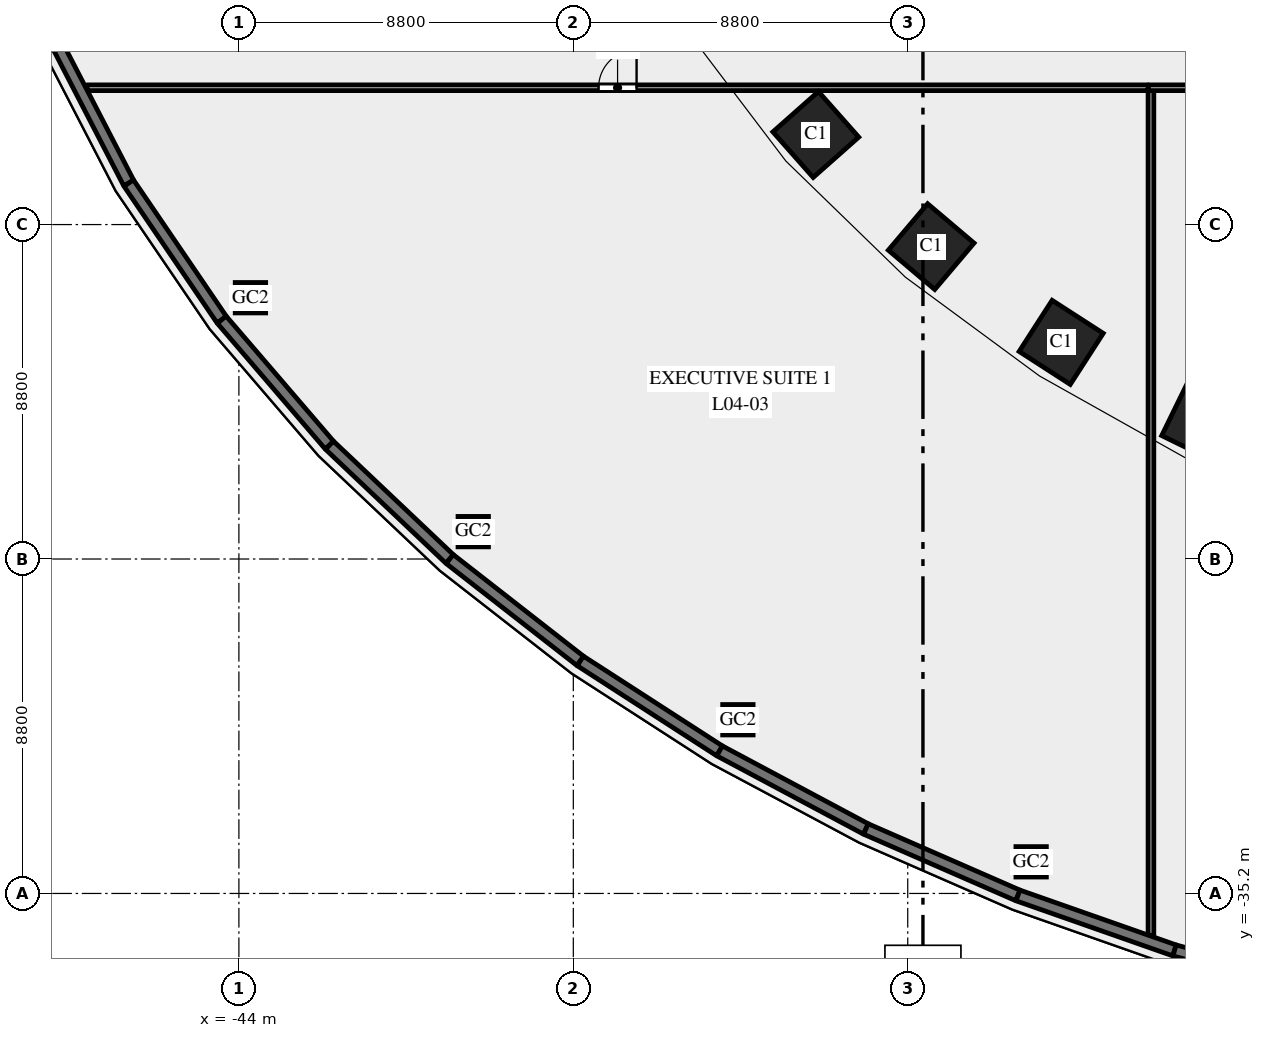
"""IFC4 building model, lengths in metres.
Left out: names, types, materials, properties, quantities, classifications, styles, units other than length and angle.
Written with IfcOpenShell. Run it as: python <this file> out.ifc"""

import sys

from ifc_helpers import new_model, si_unit, direction, frame, frame_2d, origin, origin_2d, place, context, subcontext, project, spatial, rectangle, hollow_rectangle, extrude, element, fill, save


model = new_model("IFC4")
c1 = context("Model", 3, precision=1e-05, world=origin(), true_north=direction((0.0, 1.0)))
c2 = subcontext(c1, "Body", "Model", "MODEL_VIEW")
j1 = project(units=[si_unit("LENGTHUNIT", "METRE"), si_unit("PLANEANGLEUNIT", "RADIAN")], contexts=[c1])
p1 = place(None, origin())
s1 = spatial("IfcSite", under=j1, at=p1, CompositionType="ELEMENT")
p2 = place(p1, origin())
s2 = spatial("IfcBuilding", under=s1, at=p2, CompositionType="ELEMENT")
p3 = place(p2, frame((0.0, 0.0, 25.0)))
s3 = spatial("IfcBuildingStorey", under=s2, at=p3, CompositionType="ELEMENT", Elevation=25.0)
for number, where, z_axis, x_axis in (
    (1, (-28.819, -15.23, 0.0), (0.0, 0.0, 1.0), (0.663, -0.749, 0.0)),
    (2, (-25.783, -18.18, 0.0), (0.0, 0.0, 1.0), (0.763, -0.646, 0.0)),
    (3, (-22.362, -20.7, 0.0), (0.0, 0.0, 1.0), (0.84, -0.542, 0.0)),
    (4, (-18.646, -22.785, 0.0), (0.0, 0.0, 1.0), (0.898, -0.439, 0.0)),
):
    element("IfcColumn", number, at=place(p3, frame(where, z_axis=z_axis, x_axis=x_axis)), inside=s3, PredefinedType="COLUMN", context=c2, shape_type="SweptSolid", body=[
        extrude(rectangle(XDim=1.6, YDim=1.6, at=origin_2d()), origin(), (0.0, 0.0, 1.0), 5.5),
    ])
for number, where, z_axis, x_axis in (
    (5, (-43.696, -19.525, 0.0), (0.0, 0.0, 1.0), (1.0, 0.0, 0.0)),
    (6, (-37.833, -25.68, 0.0), (0.0, 0.0, 1.0), (1.0, 0.0, 0.0)),
    (7, (-30.869, -30.629, 0.0), (0.0, 0.0, 1.0), (1.0, 0.0, 0.0)),
    (8, (-23.153, -34.368, 0.0), (0.0, 0.0, 1.0), (1.0, 0.0, 0.0)),
):
    element("IfcColumn", number, at=place(p3, frame(where, z_axis=z_axis, x_axis=x_axis)), inside=s3, PredefinedType="COLUMN", context=c2, shape_type="SweptSolid", body=[
        extrude(hollow_rectangle(XDim=0.8, YDim=0.8, WallThickness=0.04, at=origin_2d()), origin(), (0.0, 0.0, 1.0), 5.488),
    ])
p4 = place(p3, frame((-20.0, -36.302, 0.0), z_axis=(0.0, 0.0, 1.0), x_axis=(0.0, 1.0, 0.0)))
e9 = element("IfcWall", 9, at=p4, inside=s3, PredefinedType="PARTITIONING", context=c2, shape_type="SweptSolid", body=[
    extrude(rectangle(XDim=22.228, YDim=0.15, at=frame_2d((11.114, 0.0))), origin(), (0.0, 0.0, 1.0), 4.15),
])
p5 = place(p3, frame((-20.075, -14.0, 0.0), z_axis=(0.0, 0.0, 1.0), x_axis=(1.0, 0.0, 0.0)))
e10 = element("IfcWall", 10, at=p5, inside=s3, PredefinedType="PARTITIONING", context=c2, shape_type="SweptSolid", body=[
    extrude(rectangle(XDim=40.15, YDim=0.15, at=frame_2d((20.075, 0.0))), origin(), (0.0, 0.0, 1.0), 4.15),
])
p6 = place(p5, frame((19.375, 0.0, 0.0)))
e11 = element("IfcOpeningElement", 11, at=p6, cuts=e10, PredefinedType="OPENING", context=c2, shape_type="SweptSolid", body=[
    extrude(rectangle(XDim=1.4, YDim=2.1, at=frame_2d((0.7, 1.05))), frame((0.0, 0.085, 0.0), z_axis=(0.0, -1.0, 0.0), x_axis=(1.0, 0.0, 0.0)), (0.0, 0.0, 1.0), 0.17),
])
p7 = place(p3, frame((-47.997, -14.0, 0.0), z_axis=(0.0, 0.0, 1.0), x_axis=(1.0, 0.0, 0.0)))
e12 = element("IfcWall", 12, at=p7, inside=s3, PredefinedType="PARTITIONING", context=c2, shape_type="SweptSolid", body=[
    extrude(rectangle(XDim=27.923, YDim=0.15, at=frame_2d((13.961, 0.0))), origin(), (0.0, 0.0, 1.0), 4.2),
])
p8 = place(p7, frame((13.462, 0.0, 0.0)))
e13 = element("IfcOpeningElement", 13, at=p8, cuts=e12, PredefinedType="OPENING", context=c2, shape_type="SweptSolid", body=[
    extrude(rectangle(XDim=1.0, YDim=2.1, at=frame_2d((0.5, 1.05))), frame((0.0, 0.085, 0.0), z_axis=(0.0, -1.0, 0.0), x_axis=(1.0, 0.0, 0.0)), (0.0, 0.0, 1.0), 0.17),
])
p9 = place(p3, frame((-48.894, -12.649, 0.0), z_axis=(0.0, 0.0, 1.0), x_axis=(0.459242531468, -0.888310923771, 0.0)))
e14 = element("IfcWall", 14, at=p9, inside=s3, PredefinedType="SOLIDWALL", context=c2, shape_type="SweptSolid", body=[
    extrude(rectangle(XDim=4.345, YDim=0.3, at=frame_2d((2.172, 0.0))), origin(), (0.0, 0.0, 1.0), 5.2),
])
p10 = place(p9, frame((0.972, 0.0, 1.0)))
e15 = element("IfcOpeningElement", 15, at=p10, cuts=e14, PredefinedType="OPENING", context=c2, shape_type="SweptSolid", body=[
    extrude(rectangle(XDim=2.4, YDim=3.0, at=frame_2d((1.2, 1.5))), frame((0.0, 0.16, 0.0), z_axis=(0.0, -1.0, 0.0), x_axis=(1.0, 0.0, 0.0)), (0.0, 0.0, 1.0), 0.32),
])
p11 = place(p3, frame((-46.899, -16.508, 0.0), z_axis=(0.0, 0.0, 1.0), x_axis=(0.562667738859, -0.82668314102, 0.0)))
e16 = element("IfcWall", 16, at=p11, inside=s3, PredefinedType="SOLIDWALL", context=c2, shape_type="SweptSolid", body=[
    extrude(rectangle(XDim=4.349, YDim=0.3, at=frame_2d((2.174, 0.0))), origin(), (0.0, 0.0, 1.0), 5.2),
])
p12 = place(p11, frame((0.974, 0.0, 1.0)))
e17 = element("IfcOpeningElement", 17, at=p12, cuts=e16, PredefinedType="OPENING", context=c2, shape_type="SweptSolid", body=[
    extrude(rectangle(XDim=2.4, YDim=3.0, at=frame_2d((1.2, 1.5))), frame((0.0, 0.16, 0.0), z_axis=(0.0, -1.0, 0.0), x_axis=(1.0, 0.0, 0.0)), (0.0, 0.0, 1.0), 0.32),
])
p13 = place(p3, frame((-44.452, -20.104, 0.0), z_axis=(0.0, 0.0, 1.0), x_axis=(0.651387059497, -0.758745608699, 0.0)))
e18 = element("IfcWall", 18, at=p13, inside=s3, PredefinedType="SOLIDWALL", context=c2, shape_type="SweptSolid", body=[
    extrude(rectangle(XDim=4.353, YDim=0.3, at=frame_2d((2.176, 0.0))), origin(), (0.0, 0.0, 1.0), 5.2),
])
p14 = place(p13, frame((0.976, 0.0, 1.0)))
e19 = element("IfcOpeningElement", 19, at=p14, cuts=e18, PredefinedType="OPENING", context=c2, shape_type="SweptSolid", body=[
    extrude(rectangle(XDim=2.4, YDim=3.0, at=frame_2d((1.2, 1.5))), frame((0.0, 0.16, 0.0), z_axis=(0.0, -1.0, 0.0), x_axis=(1.0, 0.0, 0.0)), (0.0, 0.0, 1.0), 0.32),
])
p15 = place(p3, frame((-41.617, -23.406, 0.0), z_axis=(0.0, 0.0, 1.0), x_axis=(0.72620446032, -0.687478786444, 0.0)))
e20 = element("IfcWall", 20, at=p15, inside=s3, PredefinedType="SOLIDWALL", context=c2, shape_type="SweptSolid", body=[
    extrude(rectangle(XDim=4.356, YDim=0.3, at=frame_2d((2.178, 0.0))), origin(), (0.0, 0.0, 1.0), 5.2),
])
p16 = place(p15, frame((0.978, 0.0, 1.0)))
e21 = element("IfcOpeningElement", 21, at=p16, cuts=e20, PredefinedType="OPENING", context=c2, shape_type="SweptSolid", body=[
    extrude(rectangle(XDim=2.4, YDim=3.0, at=frame_2d((1.2, 1.5))), frame((0.0, 0.16, 0.0), z_axis=(0.0, -1.0, 0.0), x_axis=(1.0, 0.0, 0.0)), (0.0, 0.0, 1.0), 0.32),
])
p17 = place(p3, frame((-38.453, -26.401, 0.0), z_axis=(0.0, 0.0, 1.0), x_axis=(0.788491985196, -0.615045030288, 0.0)))
e22 = element("IfcWall", 22, at=p17, inside=s3, PredefinedType="SOLIDWALL", context=c2, shape_type="SweptSolid", body=[
    extrude(rectangle(XDim=4.359, YDim=0.3, at=frame_2d((2.18, 0.0))), origin(), (0.0, 0.0, 1.0), 5.2),
])
p18 = place(p17, frame((0.98, 0.0, 1.0)))
e23 = element("IfcOpeningElement", 23, at=p18, cuts=e22, PredefinedType="OPENING", context=c2, shape_type="SweptSolid", body=[
    extrude(rectangle(XDim=2.4, YDim=3.0, at=frame_2d((1.2, 1.5))), frame((0.0, 0.16, 0.0), z_axis=(0.0, -1.0, 0.0), x_axis=(1.0, 0.0, 0.0)), (0.0, 0.0, 1.0), 0.32),
])
p19 = place(p3, frame((-35.016, -29.082, 0.0), z_axis=(0.0, 0.0, 1.0), x_axis=(0.840047348843, -0.542513088969, 0.0)))
e24 = element("IfcWall", 24, at=p19, inside=s3, PredefinedType="SOLIDWALL", context=c2, shape_type="SweptSolid", body=[
    extrude(rectangle(XDim=4.362, YDim=0.3, at=frame_2d((2.181, 0.0))), origin(), (0.0, 0.0, 1.0), 5.2),
])
p20 = place(p19, frame((0.981, 0.0, 1.0)))
e25 = element("IfcOpeningElement", 25, at=p20, cuts=e24, PredefinedType="OPENING", context=c2, shape_type="SweptSolid", body=[
    extrude(rectangle(XDim=2.4, YDim=3.0, at=frame_2d((1.2, 1.5))), frame((0.0, 0.16, 0.0), z_axis=(0.0, -1.0, 0.0), x_axis=(1.0, 0.0, 0.0)), (0.0, 0.0, 1.0), 0.32),
])
p21 = place(p3, frame((-31.352, -31.448, 0.0), z_axis=(0.0, 0.0, 1.0), x_axis=(0.882159305704, -0.47095112205, 0.0)))
e26 = element("IfcWall", 26, at=p21, inside=s3, PredefinedType="SOLIDWALL", context=c2, shape_type="SweptSolid", body=[
    extrude(rectangle(XDim=4.365, YDim=0.3, at=frame_2d((2.182, 0.0))), origin(), (0.0, 0.0, 1.0), 5.2),
])
p22 = place(p21, frame((0.982, 0.0, 1.0)))
e27 = element("IfcOpeningElement", 27, at=p22, cuts=e26, PredefinedType="OPENING", context=c2, shape_type="SweptSolid", body=[
    extrude(rectangle(XDim=2.4, YDim=3.0, at=frame_2d((1.2, 1.5))), frame((0.0, 0.16, 0.0), z_axis=(0.0, -1.0, 0.0), x_axis=(1.0, 0.0, 0.0)), (0.0, 0.0, 1.0), 0.32),
])
p23 = place(p3, frame((-27.501, -33.504, 0.0), z_axis=(0.0, 0.0, 1.0), x_axis=(0.916336904548, -0.400408138483, 0.0)))
e28 = element("IfcWall", 28, at=p23, inside=s3, PredefinedType="SOLIDWALL", context=c2, shape_type="SweptSolid", body=[
    extrude(rectangle(XDim=4.366, YDim=0.3, at=frame_2d((2.183, 0.0))), origin(), (0.0, 0.0, 1.0), 5.2),
])
p24 = place(p23, frame((0.983, 0.0, 1.0)))
e29 = element("IfcOpeningElement", 29, at=p24, cuts=e28, PredefinedType="OPENING", context=c2, shape_type="SweptSolid", body=[
    extrude(rectangle(XDim=2.4, YDim=3.0, at=frame_2d((1.2, 1.5))), frame((0.0, 0.16, 0.0), z_axis=(0.0, -1.0, 0.0), x_axis=(1.0, 0.0, 0.0)), (0.0, 0.0, 1.0), 0.32),
])
p25 = place(p3, frame((-23.5, -35.252, 0.0), z_axis=(0.0, 0.0, 1.0), x_axis=(0.943526738033, -0.331296384853, 0.0)))
e30 = element("IfcWall", 30, at=p25, inside=s3, PredefinedType="SOLIDWALL", context=c2, shape_type="SweptSolid", body=[
    extrude(rectangle(XDim=4.368, YDim=0.3, at=frame_2d((2.184, 0.0))), origin(), (0.0, 0.0, 1.0), 5.2),
])
p26 = place(p25, frame((0.984, 0.0, 1.0)))
e31 = element("IfcOpeningElement", 31, at=p26, cuts=e30, PredefinedType="OPENING", context=c2, shape_type="SweptSolid", body=[
    extrude(rectangle(XDim=2.4, YDim=3.0, at=frame_2d((1.2, 1.5))), frame((0.0, 0.16, 0.0), z_axis=(0.0, -1.0, 0.0), x_axis=(1.0, 0.0, 0.0)), (0.0, 0.0, 1.0), 0.32),
])
p27 = place(p3, frame((-19.379, -36.699, 0.0), z_axis=(0.0, 0.0, 1.0), x_axis=(0.964679950239, -0.263424739931, 0.0)))
e32 = element("IfcWall", 32, at=p27, inside=s3, PredefinedType="SOLIDWALL", context=c2, shape_type="SweptSolid", body=[
    extrude(rectangle(XDim=4.369, YDim=0.3, at=frame_2d((2.185, 0.0))), origin(), (0.0, 0.0, 1.0), 5.2),
])
p28 = place(p27, frame((0.985, 0.0, 1.0)))
e33 = element("IfcOpeningElement", 33, at=p28, cuts=e32, PredefinedType="OPENING", context=c2, shape_type="SweptSolid", body=[
    extrude(rectangle(XDim=2.4, YDim=3.0, at=frame_2d((1.2, 1.5))), frame((0.0, 0.16, 0.0), z_axis=(0.0, -1.0, 0.0), x_axis=(1.0, 0.0, 0.0)), (0.0, 0.0, 1.0), 0.32),
])
p29 = place(p8, origin())
e34 = element("IfcDoor", 34, at=p29, inside=s3, OperationType="SINGLE_SWING_RIGHT", PredefinedType="DOOR", context=c2, shape_type="SweptSolid", body=[
    extrude(rectangle(XDim=1.0, YDim=2.1, at=frame_2d((0.5, 1.05))), frame((0.0, 0.025, 0.0), z_axis=(0.0, -1.0, 0.0), x_axis=(1.0, 0.0, 0.0)), (0.0, 0.0, 1.0), 0.05),
])
fill(e13, e34)
p30 = place(p10, origin())
e35 = element("IfcWindow", 35, at=p30, inside=s3, PartitioningType="SINGLE_PANEL", PredefinedType="WINDOW", context=c2, shape_type="SweptSolid", body=[
    extrude(rectangle(XDim=2.4, YDim=3.0, at=frame_2d((1.2, 1.5))), frame((0.0, 0.03, 0.0), z_axis=(0.0, -1.0, 0.0), x_axis=(1.0, 0.0, 0.0)), (0.0, 0.0, 1.0), 0.06),
])
fill(e15, e35)
p31 = place(p12, origin())
e36 = element("IfcWindow", 36, at=p31, inside=s3, PartitioningType="SINGLE_PANEL", PredefinedType="WINDOW", context=c2, shape_type="SweptSolid", body=[
    extrude(rectangle(XDim=2.4, YDim=3.0, at=frame_2d((1.2, 1.5))), frame((0.0, 0.03, 0.0), z_axis=(0.0, -1.0, 0.0), x_axis=(1.0, 0.0, 0.0)), (0.0, 0.0, 1.0), 0.06),
])
fill(e17, e36)
p32 = place(p14, origin())
e37 = element("IfcWindow", 37, at=p32, inside=s3, PartitioningType="SINGLE_PANEL", PredefinedType="WINDOW", context=c2, shape_type="SweptSolid", body=[
    extrude(rectangle(XDim=2.4, YDim=3.0, at=frame_2d((1.2, 1.5))), frame((0.0, 0.03, 0.0), z_axis=(0.0, -1.0, 0.0), x_axis=(1.0, 0.0, 0.0)), (0.0, 0.0, 1.0), 0.06),
])
fill(e19, e37)
p33 = place(p16, origin())
e38 = element("IfcWindow", 38, at=p33, inside=s3, PartitioningType="SINGLE_PANEL", PredefinedType="WINDOW", context=c2, shape_type="SweptSolid", body=[
    extrude(rectangle(XDim=2.4, YDim=3.0, at=frame_2d((1.2, 1.5))), frame((0.0, 0.03, 0.0), z_axis=(0.0, -1.0, 0.0), x_axis=(1.0, 0.0, 0.0)), (0.0, 0.0, 1.0), 0.06),
])
fill(e21, e38)
p34 = place(p18, origin())
e39 = element("IfcWindow", 39, at=p34, inside=s3, PartitioningType="SINGLE_PANEL", PredefinedType="WINDOW", context=c2, shape_type="SweptSolid", body=[
    extrude(rectangle(XDim=2.4, YDim=3.0, at=frame_2d((1.2, 1.5))), frame((0.0, 0.03, 0.0), z_axis=(0.0, -1.0, 0.0), x_axis=(1.0, 0.0, 0.0)), (0.0, 0.0, 1.0), 0.06),
])
fill(e23, e39)
p35 = place(p20, origin())
e40 = element("IfcWindow", 40, at=p35, inside=s3, PartitioningType="SINGLE_PANEL", PredefinedType="WINDOW", context=c2, shape_type="SweptSolid", body=[
    extrude(rectangle(XDim=2.4, YDim=3.0, at=frame_2d((1.2, 1.5))), frame((0.0, 0.03, 0.0), z_axis=(0.0, -1.0, 0.0), x_axis=(1.0, 0.0, 0.0)), (0.0, 0.0, 1.0), 0.06),
])
fill(e25, e40)
p36 = place(p22, origin())
e41 = element("IfcWindow", 41, at=p36, inside=s3, PartitioningType="SINGLE_PANEL", PredefinedType="WINDOW", context=c2, shape_type="SweptSolid", body=[
    extrude(rectangle(XDim=2.4, YDim=3.0, at=frame_2d((1.2, 1.5))), frame((0.0, 0.03, 0.0), z_axis=(0.0, -1.0, 0.0), x_axis=(1.0, 0.0, 0.0)), (0.0, 0.0, 1.0), 0.06),
])
fill(e27, e41)
p37 = place(p24, origin())
e42 = element("IfcWindow", 42, at=p37, inside=s3, PartitioningType="SINGLE_PANEL", PredefinedType="WINDOW", context=c2, shape_type="SweptSolid", body=[
    extrude(rectangle(XDim=2.4, YDim=3.0, at=frame_2d((1.2, 1.5))), frame((0.0, 0.03, 0.0), z_axis=(0.0, -1.0, 0.0), x_axis=(1.0, 0.0, 0.0)), (0.0, 0.0, 1.0), 0.06),
])
fill(e29, e42)
p38 = place(p26, origin())
e43 = element("IfcWindow", 43, at=p38, inside=s3, PartitioningType="SINGLE_PANEL", PredefinedType="WINDOW", context=c2, shape_type="SweptSolid", body=[
    extrude(rectangle(XDim=2.4, YDim=3.0, at=frame_2d((1.2, 1.5))), frame((0.0, 0.03, 0.0), z_axis=(0.0, -1.0, 0.0), x_axis=(1.0, 0.0, 0.0)), (0.0, 0.0, 1.0), 0.06),
])
fill(e31, e43)
save(model, sys.argv[1])
